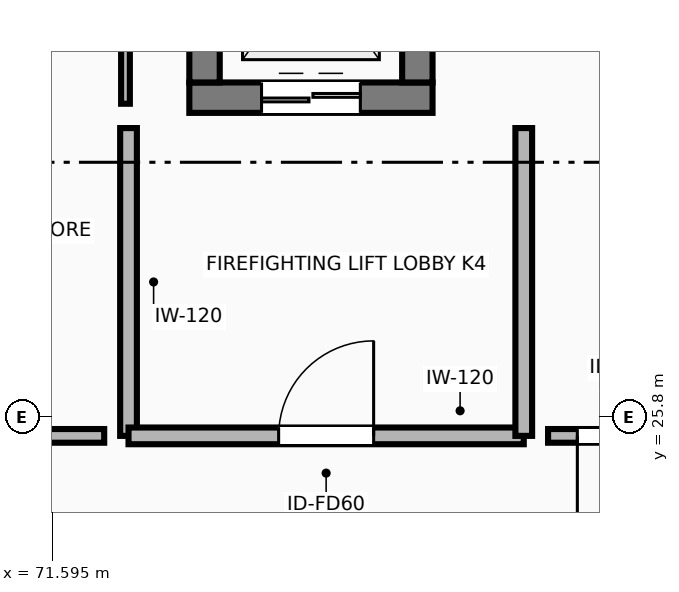
"""IFC4 building model, lengths in metres.
Left out: names, types, materials, properties, quantities, classifications, styles, units other than length and angle.
Written with IfcOpenShell. Run it as: python <this file> out.ifc"""

import sys

from ifc_helpers import new_model, si_unit, direction, frame, frame_2d, origin, place, context, subcontext, project, spatial, rectangle, extrude, element, fill, save


model = new_model("IFC4")
c1 = context("Model", 3, precision=1e-05, world=origin(), true_north=direction((0.0, 1.0)))
c2 = subcontext(c1, "Body", "Model", "MODEL_VIEW")
j1 = project(units=[si_unit("LENGTHUNIT", "METRE"), si_unit("PLANEANGLEUNIT", "RADIAN")], contexts=[c1])
p1 = place(None, origin())
s1 = spatial("IfcSite", under=j1, at=p1, CompositionType="ELEMENT")
p2 = place(p1, origin())
s2 = spatial("IfcBuilding", under=s1, at=p2, CompositionType="ELEMENT")
p3 = place(p2, frame((0.0, 0.0, -4.5)))
s3 = spatial("IfcBuildingStorey", under=s2, at=p3, CompositionType="ELEMENT", Elevation=-4.5)
p4 = place(p3, frame((73.4, 30.0, -0.55), z_axis=(0.0, 0.0, 1.0), x_axis=(1.0, 0.0, 0.0)))
e1 = element("IfcWall", 1, at=p4, inside=s3, PredefinedType="SHEAR", context=c2, shape_type="SweptSolid", body=[
    extrude(rectangle(XDim=3.2, YDim=0.4, at=frame_2d((1.6, 0.0))), origin(), (0.0, 0.0, 1.0), 5.05),
])
p5 = place(p4, frame((0.95, 0.0, 0.55)))
e2 = element("IfcOpeningElement", 2, at=p5, cuts=e1, PredefinedType="OPENING", context=c2, shape_type="SweptSolid", body=[
    extrude(rectangle(XDim=1.3, YDim=2.25, at=frame_2d((0.65, 1.125))), frame((0.0, 0.21, 0.0), z_axis=(0.0, -1.0, 0.0), x_axis=(1.0, 0.0, 0.0)), (0.0, 0.0, 1.0), 0.42),
])
for number, where, z_axis, x_axis in (
    (3, (73.6, 30.2, -0.55), (0.0, 0.0, 1.0), (0.0, 1.0, 0.0)),
    (4, (76.4, 33.3, -0.55), (0.0, 0.0, 1.0), (0.0, -1.0, 0.0)),
):
    element("IfcWall", number, at=place(p3, frame(where, z_axis=z_axis, x_axis=x_axis)), inside=s3, PredefinedType="SHEAR", context=c2, shape_type="SweptSolid", body=[
        extrude(rectangle(XDim=3.1, YDim=0.4, at=frame_2d((1.55, 0.0))), origin(), (0.0, 0.0, 1.0), 5.05),
    ])
p6 = place(p3, frame((72.6, 29.6, 0.0), z_axis=(0.0, 0.0, 1.0), x_axis=(0.0, -1.0, 0.0)))
e5 = element("IfcWall", 5, at=p6, inside=s3, PredefinedType="PARTITIONING", context=c2, shape_type="SweptSolid", body=[
    extrude(rectangle(XDim=4.05, YDim=0.22, at=frame_2d((2.025, 0.0))), origin(), (0.0, 0.0, 1.0), 4.22),
])
p7 = place(p3, frame((72.6, 25.55, 0.0), z_axis=(0.0, 0.0, 1.0), x_axis=(1.0, 0.0, 0.0)))
e6 = element("IfcWall", 6, at=p7, inside=s3, PredefinedType="PARTITIONING", context=c2, shape_type="SweptSolid", body=[
    extrude(rectangle(XDim=5.2, YDim=0.22, at=frame_2d((2.6, 0.0))), origin(), (0.0, 0.0, 1.0), 3.555),
])
p8 = place(p7, frame((1.975, 0.0, 0.0)))
e7 = element("IfcOpeningElement", 7, at=p8, cuts=e6, PredefinedType="OPENING", context=c2, shape_type="SweptSolid", body=[
    extrude(rectangle(XDim=1.25, YDim=2.2, at=frame_2d((0.625, 1.1))), frame((0.0, 0.12, 0.0), z_axis=(0.0, -1.0, 0.0), x_axis=(1.0, 0.0, 0.0)), (0.0, 0.0, 1.0), 0.24),
])
p9 = place(p3, frame((77.8, 25.55, 0.0), z_axis=(0.0, 0.0, 1.0), x_axis=(0.0, 1.0, 0.0)))
e8 = element("IfcWall", 8, at=p9, inside=s3, PredefinedType="PARTITIONING", context=c2, shape_type="SweptSolid", body=[
    extrude(rectangle(XDim=4.05, YDim=0.22, at=frame_2d((2.025, 0.0))), origin(), (0.0, 0.0, 1.0), 3.943),
])
p10 = place(p3, frame((72.28, 25.55, 0.0), z_axis=(0.0, 0.0, 1.0), x_axis=(-1.0, 0.0, 0.0)))
e9 = element("IfcWall", 9, at=p10, inside=s3, PredefinedType="PARTITIONING", context=c2, shape_type="SweptSolid", body=[
    extrude(rectangle(XDim=7.28, YDim=0.18, at=frame_2d((3.64, 0.0))), origin(), (0.0, 0.0, 1.0), 3.525),
])
p11 = place(p10, frame((2.965, 0.0, 0.0)))
e10 = element("IfcOpeningElement", 10, at=p11, cuts=e9, PredefinedType="OPENING", context=c2, shape_type="SweptSolid", body=[
    extrude(rectangle(XDim=1.35, YDim=2.2, at=frame_2d((0.675, 1.1))), frame((0.0, 0.1, 0.0), z_axis=(0.0, -1.0, 0.0), x_axis=(1.0, 0.0, 0.0)), (0.0, 0.0, 1.0), 0.2),
])
p12 = place(p3, frame((72.56, 34.16, 0.0), z_axis=(0.0, 0.0, 1.0), x_axis=(0.0, -1.0, 0.0)))
e11 = element("IfcWall", 11, at=p12, inside=s3, PredefinedType="PARTITIONING", context=c2, shape_type="SweptSolid", body=[
    extrude(rectangle(XDim=4.24, YDim=0.115, at=frame_2d((2.12, 0.0))), origin(), (0.0, 0.0, 1.0), 4.22),
])
p13 = place(p3, frame((80.24, 25.55, 0.0), z_axis=(0.0, 0.0, 1.0), x_axis=(-1.0, 0.0, 0.0)))
e12 = element("IfcWall", 12, at=p13, inside=s3, PredefinedType="PARTITIONING", context=c2, shape_type="SweptSolid", body=[
    extrude(rectangle(XDim=2.12, YDim=0.18, at=frame_2d((1.06, 0.0))), origin(), (0.0, 0.0, 1.0), 3.555),
])
p14 = place(p13, frame((0.385, 0.0, 0.0)))
e13 = element("IfcOpeningElement", 13, at=p14, cuts=e12, PredefinedType="OPENING", context=c2, shape_type="SweptSolid", body=[
    extrude(rectangle(XDim=1.35, YDim=2.2, at=frame_2d((0.675, 1.1))), frame((0.0, 0.1, 0.0), z_axis=(0.0, -1.0, 0.0), x_axis=(1.0, 0.0, 0.0)), (0.0, 0.0, 1.0), 0.2),
])
p15 = place(p5, origin())
e14 = element("IfcDoor", 14, at=p15, inside=s3, OperationType="DOUBLE_DOOR_SLIDING", PredefinedType="DOOR", context=c2, shape_type="SweptSolid", body=[
    extrude(rectangle(XDim=1.3, YDim=2.25, at=frame_2d((0.65, 1.125))), frame((0.0, 0.025, 0.0), z_axis=(0.0, -1.0, 0.0), x_axis=(1.0, 0.0, 0.0)), (0.0, 0.0, 1.0), 0.05),
])
fill(e2, e14)
p16 = place(p8, origin())
e15 = element("IfcDoor", 15, at=p16, inside=s3, OperationType="SINGLE_SWING_RIGHT", PredefinedType="DOOR", context=c2, shape_type="SweptSolid", body=[
    extrude(rectangle(XDim=1.25, YDim=2.2, at=frame_2d((0.625, 1.1))), frame((0.0, 0.025, 0.0), z_axis=(0.0, -1.0, 0.0), x_axis=(1.0, 0.0, 0.0)), (0.0, 0.0, 1.0), 0.05),
])
fill(e7, e15)
p17 = place(p14, origin())
e16 = element("IfcDoor", 16, at=p17, inside=s3, OperationType="SINGLE_SWING_RIGHT", PredefinedType="DOOR", context=c2, shape_type="SweptSolid", body=[
    extrude(rectangle(XDim=1.35, YDim=2.2, at=frame_2d((0.675, 1.1))), frame((0.0, 0.025, 0.0), z_axis=(0.0, -1.0, 0.0), x_axis=(1.0, 0.0, 0.0)), (0.0, 0.0, 1.0), 0.05),
])
fill(e13, e16)
save(model, sys.argv[1])
